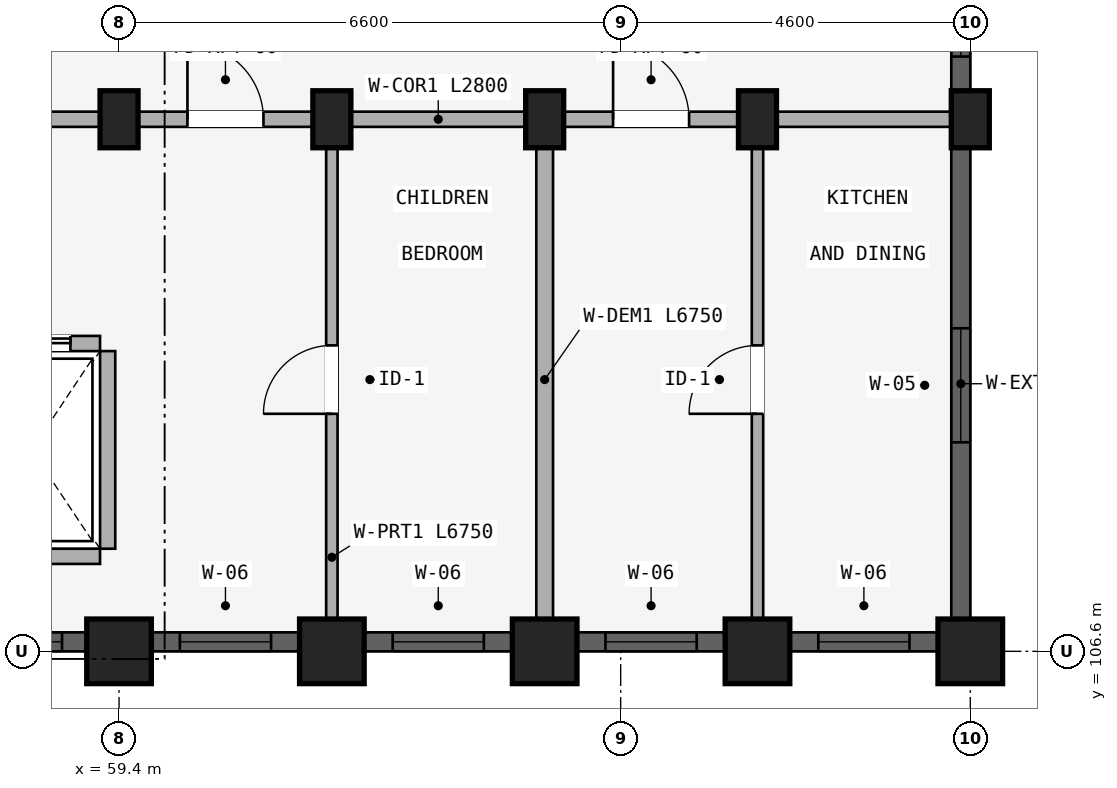
"""IFC4 building model, lengths in metres.
Left out: names, types, materials, properties, quantities, classifications, styles, units other than length and angle.
Written with IfcOpenShell. Run it as: python <this file> out.ifc"""

import sys

from ifc_helpers import new_model, si_unit, direction, frame, frame_2d, origin, origin_2d, place, context, subcontext, project, spatial, rectangle, extrude, element, fill, save


model = new_model("IFC4")
c1 = context("Model", 3, precision=1e-05, world=origin(), true_north=direction((0.0, 1.0)))
c2 = subcontext(c1, "Body", "Model", "MODEL_VIEW")
j1 = project(units=[si_unit("LENGTHUNIT", "METRE"), si_unit("PLANEANGLEUNIT", "RADIAN")], contexts=[c1])
p1 = place(None, origin())
s1 = spatial("IfcSite", under=j1, at=p1, CompositionType="ELEMENT")
p2 = place(p1, origin())
s2 = spatial("IfcBuilding", under=s1, at=p2, CompositionType="ELEMENT")
p3 = place(p2, frame((0.0, 0.0, 4.5)))
s3 = spatial("IfcBuildingStorey", under=s2, at=p3, CompositionType="ELEMENT", Elevation=4.5)
p4 = place(p3, frame((59.4, 106.6, 0.0), z_axis=(0.0, 0.0, 1.0), x_axis=(1.0, 0.0, 0.0)))
e1 = element("IfcColumn", 1, at=p4, inside=s3, PredefinedType="COLUMN", context=c2, shape_type="SweptSolid", body=[
    extrude(rectangle(XDim=0.85, YDim=0.85, at=origin_2d()), origin(), (0.0, 0.0, 1.0), 3.98),
])
p5 = place(p3, frame((59.4, 113.6, 0.0), z_axis=(0.0, 0.0, 1.0), x_axis=(1.0, 0.0, 0.0)))
e2 = element("IfcColumn", 2, at=p5, inside=s3, PredefinedType="COLUMN", context=c2, shape_type="SweptSolid", body=[
    extrude(rectangle(XDim=0.5, YDim=0.75, at=origin_2d()), origin(), (0.0, 0.0, 1.0), 3.98),
])
p6 = place(p3, frame((62.2, 106.6, 0.0), z_axis=(0.0, 0.0, 1.0), x_axis=(1.0, 0.0, 0.0)))
e3 = element("IfcColumn", 3, at=p6, inside=s3, PredefinedType="COLUMN", context=c2, shape_type="SweptSolid", body=[
    extrude(rectangle(XDim=0.85, YDim=0.85, at=origin_2d()), origin(), (0.0, 0.0, 1.0), 3.98),
])
p7 = place(p3, frame((62.2, 113.6, 0.0), z_axis=(0.0, 0.0, 1.0), x_axis=(1.0, 0.0, 0.0)))
e4 = element("IfcColumn", 4, at=p7, inside=s3, PredefinedType="COLUMN", context=c2, shape_type="SweptSolid", body=[
    extrude(rectangle(XDim=0.5, YDim=0.75, at=origin_2d()), origin(), (0.0, 0.0, 1.0), 3.98),
])
p8 = place(p3, frame((65.0, 106.6, 0.0), z_axis=(0.0, 0.0, 1.0), x_axis=(1.0, 0.0, 0.0)))
e5 = element("IfcColumn", 5, at=p8, inside=s3, PredefinedType="COLUMN", context=c2, shape_type="SweptSolid", body=[
    extrude(rectangle(XDim=0.85, YDim=0.85, at=origin_2d()), origin(), (0.0, 0.0, 1.0), 3.98),
])
p9 = place(p3, frame((65.0, 113.6, 0.0), z_axis=(0.0, 0.0, 1.0), x_axis=(1.0, 0.0, 0.0)))
e6 = element("IfcColumn", 6, at=p9, inside=s3, PredefinedType="COLUMN", context=c2, shape_type="SweptSolid", body=[
    extrude(rectangle(XDim=0.5, YDim=0.75, at=origin_2d()), origin(), (0.0, 0.0, 1.0), 3.98),
])
p10 = place(p3, frame((67.8, 106.6, 0.0), z_axis=(0.0, 0.0, 1.0), x_axis=(1.0, 0.0, 0.0)))
e7 = element("IfcColumn", 7, at=p10, inside=s3, PredefinedType="COLUMN", context=c2, shape_type="SweptSolid", body=[
    extrude(rectangle(XDim=0.85, YDim=0.85, at=origin_2d()), origin(), (0.0, 0.0, 1.0), 3.98),
])
p11 = place(p3, frame((67.8, 113.6, 0.0), z_axis=(0.0, 0.0, 1.0), x_axis=(1.0, 0.0, 0.0)))
e8 = element("IfcColumn", 8, at=p11, inside=s3, PredefinedType="COLUMN", context=c2, shape_type="SweptSolid", body=[
    extrude(rectangle(XDim=0.5, YDim=0.75, at=origin_2d()), origin(), (0.0, 0.0, 1.0), 3.98),
])
p12 = place(p3, frame((70.6, 106.6, 0.0), z_axis=(0.0, 0.0, 1.0), x_axis=(1.0, 0.0, 0.0)))
e9 = element("IfcColumn", 9, at=p12, inside=s3, PredefinedType="COLUMN", context=c2, shape_type="SweptSolid", body=[
    extrude(rectangle(XDim=0.85, YDim=0.85, at=origin_2d()), origin(), (0.0, 0.0, 1.0), 3.98),
])
p13 = place(p3, frame((70.6, 113.6, 0.0), z_axis=(0.0, 0.0, 1.0), x_axis=(1.0, 0.0, 0.0)))
e10 = element("IfcColumn", 10, at=p13, inside=s3, PredefinedType="COLUMN", context=c2, shape_type="SweptSolid", body=[
    extrude(rectangle(XDim=0.5, YDim=0.75, at=origin_2d()), origin(), (0.0, 0.0, 1.0), 3.98),
])
p14 = place(p3, frame((59.25, 107.95, 0.0), z_axis=(0.0, 0.0, 1.0), x_axis=(0.0, 1.0, 0.0)))
e11 = element("IfcWall", 11, at=p14, inside=s3, PredefinedType="STANDARD", context=c2, shape_type="SweptSolid", body=[
    extrude(rectangle(XDim=2.6, YDim=0.2, at=frame_2d((1.3, 0.0))), origin(), (0.0, 0.0, 1.0), 3.322),
])
p15 = place(p3, frame((57.35, 107.85, 0.0), z_axis=(0.0, 0.0, 1.0), x_axis=(1.0, 0.0, 0.0)))
e12 = element("IfcWall", 12, at=p15, inside=s3, PredefinedType="STANDARD", context=c2, shape_type="SweptSolid", body=[
    extrude(rectangle(XDim=1.8, YDim=0.2, at=frame_2d((0.9, 0.0))), origin(), (0.0, 0.0, 1.0), 3.98),
])
p16 = place(p3, frame((57.35, 110.65, 0.0), z_axis=(0.0, 0.0, 1.0), x_axis=(1.0, 0.0, 0.0)))
e13 = element("IfcWall", 13, at=p16, inside=s3, PredefinedType="STANDARD", context=c2, shape_type="SweptSolid", body=[
    extrude(rectangle(XDim=1.8, YDim=0.2, at=frame_2d((0.9, 0.0))), origin(), (0.0, 0.0, 1.0), 3.98),
])
p17 = place(p16, frame((0.39, 0.0, 0.0)))
e14 = element("IfcOpeningElement", 14, at=p17, cuts=e13, PredefinedType="OPENING", context=c2, shape_type="SweptSolid", body=[
    extrude(rectangle(XDim=1.02, YDim=2.15, at=frame_2d((0.51, 1.075))), frame((0.0, 0.11, 0.0), z_axis=(0.0, -1.0, 0.0), x_axis=(1.0, 0.0, 0.0)), (0.0, 0.0, 1.0), 0.22),
])
p18 = place(p3, frame((53.75, 113.6, 0.0), z_axis=(0.0, 0.0, 1.0), x_axis=(1.0, 0.0, 0.0)))
e15 = element("IfcWall", 15, at=p18, inside=s3, PredefinedType="STANDARD", context=c2, shape_type="SweptSolid", body=[
    extrude(rectangle(XDim=5.6, YDim=0.2, at=frame_2d((2.8, 0.0))), origin(), (0.0, 0.0, 1.0), 3.322),
])
p19 = place(p18, frame((1.91, 0.0, 0.0)))
e16 = element("IfcOpeningElement", 16, at=p19, cuts=e15, PredefinedType="OPENING", context=c2, shape_type="SweptSolid", body=[
    extrude(rectangle(XDim=1.22, YDim=2.15, at=frame_2d((0.61, 1.075))), frame((0.0, 0.11, 0.0), z_axis=(0.0, -1.0, 0.0), x_axis=(1.0, 0.0, 0.0)), (0.0, 0.0, 1.0), 0.22),
])
p20 = place(p3, frame((59.4, 113.6, 0.0), z_axis=(0.0, 0.0, 1.0), x_axis=(1.0, 0.0, 0.0)))
e17 = element("IfcWall", 17, at=p20, inside=s3, PredefinedType="STANDARD", context=c2, shape_type="SweptSolid", body=[
    extrude(rectangle(XDim=2.8, YDim=0.2, at=frame_2d((1.4, 0.0))), origin(), (0.0, 0.0, 1.0), 3.322),
])
p21 = place(p20, frame((0.9, 0.0, 0.0)))
e18 = element("IfcOpeningElement", 18, at=p21, cuts=e17, PredefinedType="OPENING", context=c2, shape_type="SweptSolid", body=[
    extrude(rectangle(XDim=1.0, YDim=2.15, at=frame_2d((0.5, 1.075))), frame((0.0, 0.11, 0.0), z_axis=(0.0, -1.0, 0.0), x_axis=(1.0, 0.0, 0.0)), (0.0, 0.0, 1.0), 0.22),
])
p22 = place(p3, frame((62.2, 113.6, 0.0), z_axis=(0.0, 0.0, 1.0), x_axis=(1.0, 0.0, 0.0)))
e19 = element("IfcWall", 19, at=p22, inside=s3, PredefinedType="STANDARD", context=c2, shape_type="SweptSolid", body=[
    extrude(rectangle(XDim=2.8, YDim=0.2, at=frame_2d((1.4, 0.0))), origin(), (0.0, 0.0, 1.0), 3.322),
])
p23 = place(p3, frame((65.0, 113.6, 0.0), z_axis=(0.0, 0.0, 1.0), x_axis=(1.0, 0.0, 0.0)))
e20 = element("IfcWall", 20, at=p23, inside=s3, PredefinedType="STANDARD", context=c2, shape_type="SweptSolid", body=[
    extrude(rectangle(XDim=2.8, YDim=0.2, at=frame_2d((1.4, 0.0))), origin(), (0.0, 0.0, 1.0), 3.322),
])
p24 = place(p23, frame((0.9, 0.0, 0.0)))
e21 = element("IfcOpeningElement", 21, at=p24, cuts=e20, PredefinedType="OPENING", context=c2, shape_type="SweptSolid", body=[
    extrude(rectangle(XDim=1.0, YDim=2.15, at=frame_2d((0.5, 1.075))), frame((0.0, 0.11, 0.0), z_axis=(0.0, -1.0, 0.0), x_axis=(1.0, 0.0, 0.0)), (0.0, 0.0, 1.0), 0.22),
])
p25 = place(p3, frame((67.8, 113.6, 0.0), z_axis=(0.0, 0.0, 1.0), x_axis=(1.0, 0.0, 0.0)))
e22 = element("IfcWall", 22, at=p25, inside=s3, PredefinedType="STANDARD", context=c2, shape_type="SweptSolid", body=[
    extrude(rectangle(XDim=2.8, YDim=0.2, at=frame_2d((1.4, 0.0))), origin(), (0.0, 0.0, 1.0), 3.322),
])
p26 = place(p3, frame((62.2, 106.8, 0.0), z_axis=(0.0, 0.0, 1.0), x_axis=(0.0, 1.0, 0.0)))
e23 = element("IfcWall", 23, at=p26, inside=s3, PredefinedType="PARTITIONING", context=c2, shape_type="SweptSolid", body=[
    extrude(rectangle(XDim=6.75, YDim=0.15, at=frame_2d((3.375, 0.0))), origin(), (0.0, 0.0, 1.0), 3.322),
])
p27 = place(p26, frame((2.925, 0.0, 0.0)))
e24 = element("IfcOpeningElement", 24, at=p27, cuts=e23, PredefinedType="OPENING", context=c2, shape_type="SweptSolid", body=[
    extrude(rectangle(XDim=0.9, YDim=2.1, at=frame_2d((0.45, 1.05))), frame((0.0, 0.085, 0.0), z_axis=(0.0, -1.0, 0.0), x_axis=(1.0, 0.0, 0.0)), (0.0, 0.0, 1.0), 0.17),
])
p28 = place(p3, frame((65.0, 106.8, 0.0), z_axis=(0.0, 0.0, 1.0), x_axis=(0.0, 1.0, 0.0)))
e25 = element("IfcWall", 25, at=p28, inside=s3, PredefinedType="STANDARD", context=c2, shape_type="SweptSolid", body=[
    extrude(rectangle(XDim=6.75, YDim=0.22, at=frame_2d((3.375, 0.0))), origin(), (0.0, 0.0, 1.0), 3.322),
])
p29 = place(p3, frame((67.8, 106.8, 0.0), z_axis=(0.0, 0.0, 1.0), x_axis=(0.0, 1.0, 0.0)))
e26 = element("IfcWall", 26, at=p29, inside=s3, PredefinedType="PARTITIONING", context=c2, shape_type="SweptSolid", body=[
    extrude(rectangle(XDim=6.75, YDim=0.15, at=frame_2d((3.375, 0.0))), origin(), (0.0, 0.0, 1.0), 3.322),
])
p30 = place(p29, frame((2.925, 0.0, 0.0)))
e27 = element("IfcOpeningElement", 27, at=p30, cuts=e26, PredefinedType="OPENING", context=c2, shape_type="SweptSolid", body=[
    extrude(rectangle(XDim=0.9, YDim=2.1, at=frame_2d((0.45, 1.05))), frame((0.0, 0.085, 0.0), z_axis=(0.0, -1.0, 0.0), x_axis=(1.0, 0.0, 0.0)), (0.0, 0.0, 1.0), 0.17),
])
p31 = place(p3, frame((56.628, 106.725, 0.0), z_axis=(0.0, 0.0, 1.0), x_axis=(1.0, 0.0, 0.0)))
e28 = element("IfcWall", 28, at=p31, inside=s3, PredefinedType="STANDARD", context=c2, shape_type="SweptSolid", body=[
    extrude(rectangle(XDim=2.422, YDim=0.25, at=frame_2d((1.211, 0.0))), origin(), (0.0, 0.0, 1.0), 3.522),
])
p32 = place(p31, frame((0.822, 0.0, 0.88)))
e29 = element("IfcOpeningElement", 29, at=p32, cuts=e28, PredefinedType="OPENING", context=c2, shape_type="SweptSolid", body=[
    extrude(rectangle(XDim=1.2, YDim=1.5, at=frame_2d((0.6, 0.75))), frame((0.0, 0.135, 0.0), z_axis=(0.0, -1.0, 0.0), x_axis=(1.0, 0.0, 0.0)), (0.0, 0.0, 1.0), 0.27),
])
p33 = place(p3, frame((59.82, 106.725, 0.0), z_axis=(0.0, 0.0, 1.0), x_axis=(1.0, 0.0, 0.0)))
e30 = element("IfcWall", 30, at=p33, inside=s3, PredefinedType="STANDARD", context=c2, shape_type="SweptSolid", body=[
    extrude(rectangle(XDim=1.96, YDim=0.25, at=frame_2d((0.98, 0.0))), origin(), (0.0, 0.0, 1.0), 3.522),
])
p34 = place(p33, frame((0.38, 0.0, 0.88)))
e31 = element("IfcOpeningElement", 31, at=p34, cuts=e30, PredefinedType="OPENING", context=c2, shape_type="SweptSolid", body=[
    extrude(rectangle(XDim=1.2, YDim=1.5, at=frame_2d((0.6, 0.75))), frame((0.0, 0.135, 0.0), z_axis=(0.0, -1.0, 0.0), x_axis=(1.0, 0.0, 0.0)), (0.0, 0.0, 1.0), 0.27),
])
p35 = place(p3, frame((62.62, 106.725, 0.0), z_axis=(0.0, 0.0, 1.0), x_axis=(1.0, 0.0, 0.0)))
e32 = element("IfcWall", 32, at=p35, inside=s3, PredefinedType="STANDARD", context=c2, shape_type="SweptSolid", body=[
    extrude(rectangle(XDim=1.96, YDim=0.25, at=frame_2d((0.98, 0.0))), origin(), (0.0, 0.0, 1.0), 3.522),
])
p36 = place(p35, frame((0.38, 0.0, 0.88)))
e33 = element("IfcOpeningElement", 33, at=p36, cuts=e32, PredefinedType="OPENING", context=c2, shape_type="SweptSolid", body=[
    extrude(rectangle(XDim=1.2, YDim=1.5, at=frame_2d((0.6, 0.75))), frame((0.0, 0.135, 0.0), z_axis=(0.0, -1.0, 0.0), x_axis=(1.0, 0.0, 0.0)), (0.0, 0.0, 1.0), 0.27),
])
p37 = place(p3, frame((65.42, 106.725, 0.0), z_axis=(0.0, 0.0, 1.0), x_axis=(1.0, 0.0, 0.0)))
e34 = element("IfcWall", 34, at=p37, inside=s3, PredefinedType="STANDARD", context=c2, shape_type="SweptSolid", body=[
    extrude(rectangle(XDim=1.96, YDim=0.25, at=frame_2d((0.98, 0.0))), origin(), (0.0, 0.0, 1.0), 3.522),
])
p38 = place(p37, frame((0.38, 0.0, 0.88)))
e35 = element("IfcOpeningElement", 35, at=p38, cuts=e34, PredefinedType="OPENING", context=c2, shape_type="SweptSolid", body=[
    extrude(rectangle(XDim=1.2, YDim=1.5, at=frame_2d((0.6, 0.75))), frame((0.0, 0.135, 0.0), z_axis=(0.0, -1.0, 0.0), x_axis=(1.0, 0.0, 0.0)), (0.0, 0.0, 1.0), 0.27),
])
p39 = place(p3, frame((68.22, 106.725, 0.0), z_axis=(0.0, 0.0, 1.0), x_axis=(1.0, 0.0, 0.0)))
e36 = element("IfcWall", 36, at=p39, inside=s3, PredefinedType="STANDARD", context=c2, shape_type="SweptSolid", body=[
    extrude(rectangle(XDim=1.96, YDim=0.25, at=frame_2d((0.98, 0.0))), origin(), (0.0, 0.0, 1.0), 3.522),
])
p40 = place(p39, frame((0.38, 0.0, 0.88)))
e37 = element("IfcOpeningElement", 37, at=p40, cuts=e36, PredefinedType="OPENING", context=c2, shape_type="SweptSolid", body=[
    extrude(rectangle(XDim=1.2, YDim=1.5, at=frame_2d((0.6, 0.75))), frame((0.0, 0.135, 0.0), z_axis=(0.0, -1.0, 0.0), x_axis=(1.0, 0.0, 0.0)), (0.0, 0.0, 1.0), 0.27),
])
p41 = place(p3, frame((70.475, 107.02, 0.0), z_axis=(0.0, 0.0, 1.0), x_axis=(0.0, 1.0, 0.0)))
e38 = element("IfcWall", 38, at=p41, inside=s3, PredefinedType="STANDARD", context=c2, shape_type="SweptSolid", body=[
    extrude(rectangle(XDim=6.201, YDim=0.25, at=frame_2d((3.101, 0.0))), origin(), (0.0, 0.0, 1.0), 3.322),
])
p42 = place(p41, frame((2.33, 0.0, 0.88)))
e39 = element("IfcOpeningElement", 39, at=p42, cuts=e38, PredefinedType="OPENING", context=c2, shape_type="SweptSolid", body=[
    extrude(rectangle(XDim=1.5, YDim=1.65, at=frame_2d((0.75, 0.825))), frame((0.0, 0.135, 0.0), z_axis=(0.0, -1.0, 0.0), x_axis=(1.0, 0.0, 0.0)), (0.0, 0.0, 1.0), 0.27),
])
p43 = place(p3, frame((70.475, 113.979, 0.0), z_axis=(0.0, 0.0, 1.0), x_axis=(0.0, 1.0, 0.0)))
e40 = element("IfcWall", 40, at=p43, inside=s3, PredefinedType="STANDARD", context=c2, shape_type="SweptSolid", body=[
    extrude(rectangle(XDim=1.643, YDim=0.25, at=frame_2d((0.822, 0.0))), origin(), (0.0, 0.0, 1.0), 3.322),
])
p44 = place(p43, frame((0.447, 0.0, 0.88)))
e41 = element("IfcOpeningElement", 41, at=p44, cuts=e40, PredefinedType="OPENING", context=c2, shape_type="SweptSolid", body=[
    extrude(rectangle(XDim=0.75, YDim=1.05, at=frame_2d((0.375, 0.525))), frame((0.0, 0.135, 0.0), z_axis=(0.0, -1.0, 0.0), x_axis=(1.0, 0.0, 0.0)), (0.0, 0.0, 1.0), 0.27),
])
p45 = place(p32, origin())
e42 = element("IfcWindow", 42, at=p45, inside=s3, PartitioningType="SINGLE_PANEL", PredefinedType="WINDOW", context=c2, shape_type="SweptSolid", body=[
    extrude(rectangle(XDim=1.2, YDim=1.5, at=frame_2d((0.6, 0.75))), frame((0.0, 0.03, 0.0), z_axis=(0.0, -1.0, 0.0), x_axis=(1.0, 0.0, 0.0)), (0.0, 0.0, 1.0), 0.06),
])
fill(e29, e42)
p46 = place(p34, origin())
e43 = element("IfcWindow", 43, at=p46, inside=s3, PartitioningType="SINGLE_PANEL", PredefinedType="WINDOW", context=c2, shape_type="SweptSolid", body=[
    extrude(rectangle(XDim=1.2, YDim=1.5, at=frame_2d((0.6, 0.75))), frame((0.0, 0.03, 0.0), z_axis=(0.0, -1.0, 0.0), x_axis=(1.0, 0.0, 0.0)), (0.0, 0.0, 1.0), 0.06),
])
fill(e31, e43)
p47 = place(p36, origin())
e44 = element("IfcWindow", 44, at=p47, inside=s3, PartitioningType="SINGLE_PANEL", PredefinedType="WINDOW", context=c2, shape_type="SweptSolid", body=[
    extrude(rectangle(XDim=1.2, YDim=1.5, at=frame_2d((0.6, 0.75))), frame((0.0, 0.03, 0.0), z_axis=(0.0, -1.0, 0.0), x_axis=(1.0, 0.0, 0.0)), (0.0, 0.0, 1.0), 0.06),
])
fill(e33, e44)
p48 = place(p38, origin())
e45 = element("IfcWindow", 45, at=p48, inside=s3, PartitioningType="SINGLE_PANEL", PredefinedType="WINDOW", context=c2, shape_type="SweptSolid", body=[
    extrude(rectangle(XDim=1.2, YDim=1.5, at=frame_2d((0.6, 0.75))), frame((0.0, 0.03, 0.0), z_axis=(0.0, -1.0, 0.0), x_axis=(1.0, 0.0, 0.0)), (0.0, 0.0, 1.0), 0.06),
])
fill(e35, e45)
p49 = place(p40, origin())
e46 = element("IfcWindow", 46, at=p49, inside=s3, PartitioningType="SINGLE_PANEL", PredefinedType="WINDOW", context=c2, shape_type="SweptSolid", body=[
    extrude(rectangle(XDim=1.2, YDim=1.5, at=frame_2d((0.6, 0.75))), frame((0.0, 0.03, 0.0), z_axis=(0.0, -1.0, 0.0), x_axis=(1.0, 0.0, 0.0)), (0.0, 0.0, 1.0), 0.06),
])
fill(e37, e46)
p50 = place(p42, origin())
e47 = element("IfcWindow", 47, at=p50, inside=s3, PartitioningType="DOUBLE_PANEL_VERTICAL", PredefinedType="WINDOW", context=c2, shape_type="SweptSolid", body=[
    extrude(rectangle(XDim=1.5, YDim=1.65, at=frame_2d((0.75, 0.825))), frame((0.0, 0.03, 0.0), z_axis=(0.0, -1.0, 0.0), x_axis=(1.0, 0.0, 0.0)), (0.0, 0.0, 1.0), 0.06),
])
fill(e39, e47)
p51 = place(p44, origin())
e48 = element("IfcWindow", 48, at=p51, inside=s3, PartitioningType="SINGLE_PANEL", PredefinedType="WINDOW", context=c2, shape_type="SweptSolid", body=[
    extrude(rectangle(XDim=0.75, YDim=1.05, at=frame_2d((0.375, 0.525))), frame((0.0, 0.03, 0.0), z_axis=(0.0, -1.0, 0.0), x_axis=(1.0, 0.0, 0.0)), (0.0, 0.0, 1.0), 0.06),
])
fill(e41, e48)
p52 = place(p17, origin())
e49 = element("IfcDoor", 49, at=p52, inside=s3, OperationType="SLIDING_TO_RIGHT", PredefinedType="DOOR", context=c2, shape_type="SweptSolid", body=[
    extrude(rectangle(XDim=1.02, YDim=2.15, at=frame_2d((0.51, 1.075))), frame((0.0, 0.025, 0.0), z_axis=(0.0, -1.0, 0.0), x_axis=(1.0, 0.0, 0.0)), (0.0, 0.0, 1.0), 0.05),
])
fill(e14, e49)
p53 = place(p21, frame((1.0, 0.0, 0.0), z_axis=(0.0, 0.0, 1.0), x_axis=(-1.0, 0.0, 0.0)))
e50 = element("IfcDoor", 50, at=p53, inside=s3, OperationType="SINGLE_SWING_RIGHT", PredefinedType="DOOR", context=c2, shape_type="SweptSolid", body=[
    extrude(rectangle(XDim=1.0, YDim=2.15, at=frame_2d((0.5, 1.075))), frame((0.0, 0.025, 0.0), z_axis=(0.0, -1.0, 0.0), x_axis=(1.0, 0.0, 0.0)), (0.0, 0.0, 1.0), 0.05),
])
fill(e18, e50)
p54 = place(p24, frame((1.0, 0.0, 0.0), z_axis=(0.0, 0.0, 1.0), x_axis=(-1.0, 0.0, 0.0)))
e51 = element("IfcDoor", 51, at=p54, inside=s3, OperationType="SINGLE_SWING_RIGHT", PredefinedType="DOOR", context=c2, shape_type="SweptSolid", body=[
    extrude(rectangle(XDim=1.0, YDim=2.15, at=frame_2d((0.5, 1.075))), frame((0.0, 0.025, 0.0), z_axis=(0.0, -1.0, 0.0), x_axis=(1.0, 0.0, 0.0)), (0.0, 0.0, 1.0), 0.05),
])
fill(e21, e51)
p55 = place(p27, origin())
e52 = element("IfcDoor", 52, at=p55, inside=s3, OperationType="SINGLE_SWING_LEFT", PredefinedType="DOOR", context=c2, shape_type="SweptSolid", body=[
    extrude(rectangle(XDim=0.9, YDim=2.1, at=frame_2d((0.45, 1.05))), frame((0.0, 0.025, 0.0), z_axis=(0.0, -1.0, 0.0), x_axis=(1.0, 0.0, 0.0)), (0.0, 0.0, 1.0), 0.05),
])
fill(e24, e52)
p56 = place(p30, frame((0.9, 0.0, 0.0), z_axis=(0.0, 0.0, 1.0), x_axis=(-1.0, 0.0, 0.0)))
e53 = element("IfcDoor", 53, at=p56, inside=s3, OperationType="SINGLE_SWING_RIGHT", PredefinedType="DOOR", context=c2, shape_type="SweptSolid", body=[
    extrude(rectangle(XDim=0.9, YDim=2.1, at=frame_2d((0.45, 1.05))), frame((0.0, 0.025, 0.0), z_axis=(0.0, -1.0, 0.0), x_axis=(1.0, 0.0, 0.0)), (0.0, 0.0, 1.0), 0.05),
])
fill(e27, e53)
save(model, sys.argv[1])
